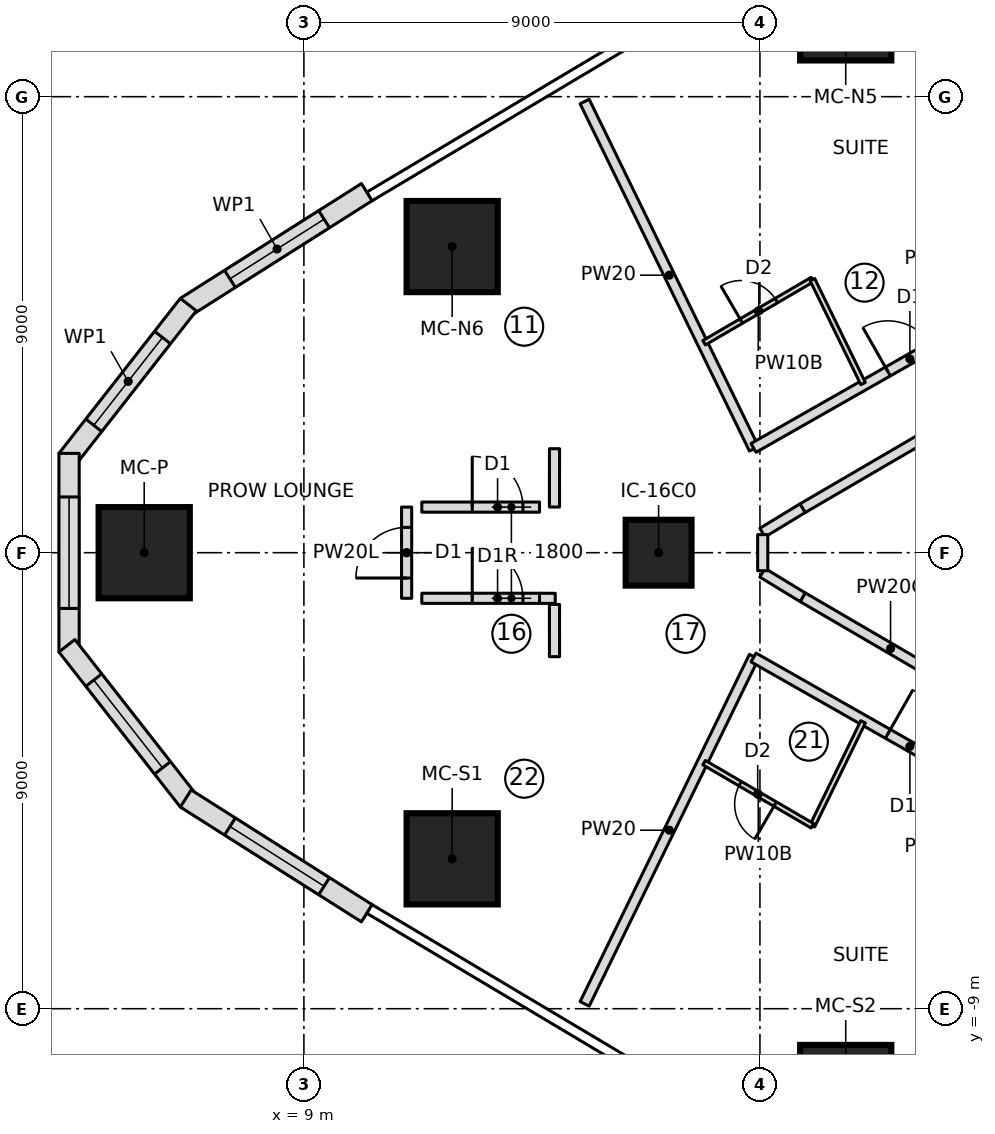
"""IFC4 building model, lengths in metres.
Left out: names, types, materials, properties, quantities, classifications, styles, units other than length and angle.
Written with IfcOpenShell. Run it as: python <this file> out.ifc"""

import sys

from ifc_helpers import new_model, si_unit, direction, frame, frame_2d, origin, origin_2d, place, context, subcontext, project, spatial, polyline, rectangle, outline, extrude, element, fill, save


model = new_model("IFC4")
c1 = context("Model", 3, precision=1e-05, world=origin(), true_north=direction((0.0, 1.0)))
c2 = subcontext(c1, "Body", "Model", "MODEL_VIEW")
j1 = project(units=[si_unit("LENGTHUNIT", "METRE"), si_unit("PLANEANGLEUNIT", "RADIAN")], contexts=[c1])
p1 = place(None, origin())
s1 = spatial("IfcSite", under=j1, at=p1, CompositionType="ELEMENT")
p2 = place(p1, origin())
s2 = spatial("IfcBuilding", under=s1, at=p2, CompositionType="ELEMENT")
p3 = place(p2, frame((0.0, 0.0, 50.25)))
s3 = spatial("IfcBuildingStorey", under=s2, at=p3, CompositionType="ELEMENT", Elevation=50.25)
for number, where, z_axis, x_axis in (
    (1, (5.848, 0.0, 0.0), (0.0, 0.0, 1.0), (1.0, 0.0, 0.0)),
    (2, (11.927, -6.042, 0.0), (0.0, 0.0, 1.0), (1.0, 0.0, 0.0)),
    (3, (19.693, -10.615, 0.0), (0.0, 0.0, 1.0), (1.0, 0.0, 0.0)),
    (4, (19.693, 10.615, 0.0), (0.0, 0.0, 1.0), (1.0, 0.0, 0.0)),
    (5, (11.927, 6.042, 0.0), (0.0, 0.0, 1.0), (1.0, 0.0, 0.0)),
):
    element("IfcColumn", number, at=place(p3, frame(where, z_axis=z_axis, x_axis=x_axis)), inside=s3, PredefinedType="COLUMN", context=c2, shape_type="SweptSolid", body=[
        extrude(rectangle(XDim=1.8, YDim=1.8, at=origin_2d()), origin(), (0.0, 0.0, 1.0), 3.55),
    ])
p4 = place(p3, frame((16.0, 0.0, 0.0), z_axis=(0.0, 0.0, 1.0), x_axis=(1.0, 0.0, 0.0)))
e6 = element("IfcColumn", 6, at=p4, inside=s3, PredefinedType="COLUMN", context=c2, shape_type="SweptSolid", body=[
    extrude(rectangle(XDim=1.3, YDim=1.3, at=origin_2d()), origin(), (0.0, 0.0, 1.0), 3.55),
])
p5 = place(p3, frame((10.242, 7.116, 0.0), z_axis=(0.0, 0.0, 1.0), x_axis=(-0.844551578623, -0.535474211372, 0.0)))
e7 = element("IfcWall", 7, at=p5, inside=s3, PredefinedType="NOTDEFINED", context=c2, shape_type="SweptSolid", body=[
    extrude(outline(polyline([(0.0, -0.2), (4.23, -0.2), (4.162, 0.2), (0.0, 0.2), (0.0, -0.2)])), origin(), (0.0, 0.0, 1.0), 3.25),
])
p6 = place(p5, frame((0.998, 0.0, 0.6)))
e8 = element("IfcOpeningElement", 8, at=p6, cuts=e7, PredefinedType="OPENING", context=c2, shape_type="SweptSolid", body=[
    extrude(outline(polyline([(0.0, 1.35), (0.084, 1.771), (0.322, 2.128), (0.679, 2.366), (1.1, 2.45), (1.521, 2.366), (1.878, 2.128), (2.116, 1.771), (2.2, 1.35), (2.2, 1.1), (2.116, 0.679), (1.878, 0.322), (1.521, 0.084), (1.1, 0.0), (0.679, 0.084), (0.322, 0.322), (0.084, 0.679), (0.0, 1.1), (0.0, 1.35)])), frame((0.0, 0.21, 0.0), z_axis=(0.0, -1.0, 0.0), x_axis=(1.0, 0.0, 0.0)), (0.0, 0.0, 1.0), 0.42),
])
p7 = place(p3, frame((6.698, 4.87, 0.0), z_axis=(0.0, 0.0, 1.0), x_axis=(-0.616586647779, -0.787287054245, 0.0)))
e9 = element("IfcWall", 9, at=p7, inside=s3, PredefinedType="NOTDEFINED", context=c2, shape_type="SweptSolid", body=[
    extrude(outline(polyline([(-0.034, -0.2), (3.852, -0.2), (3.714, 0.2), (0.034, 0.2), (-0.034, -0.2)])), origin(), (0.0, 0.0, 1.0), 3.25),
])
p8 = place(p7, frame((0.792, 0.0, 0.6)))
e10 = element("IfcOpeningElement", 10, at=p8, cuts=e9, PredefinedType="OPENING", context=c2, shape_type="SweptSolid", body=[
    extrude(outline(polyline([(0.0, 1.35), (0.084, 1.771), (0.322, 2.128), (0.679, 2.366), (1.1, 2.45), (1.521, 2.366), (1.878, 2.128), (2.116, 1.771), (2.2, 1.35), (2.2, 1.1), (2.116, 0.679), (1.878, 0.322), (1.521, 0.084), (1.1, 0.0), (0.679, 0.084), (0.322, 0.322), (0.084, 0.679), (0.0, 1.1), (0.0, 1.35)])), frame((0.0, 0.21, 0.0), z_axis=(0.0, -1.0, 0.0), x_axis=(1.0, 0.0, 0.0)), (0.0, 0.0, 1.0), 0.42),
])
p9 = place(p3, frame((4.365, 1.891, 0.0), z_axis=(0.0, 0.0, 1.0), x_axis=(0.0, -1.0, 0.0)))
e11 = element("IfcWall", 11, at=p9, inside=s3, PredefinedType="NOTDEFINED", context=c2, shape_type="SweptSolid", body=[
    extrude(outline(polyline([(-0.069, -0.2), (3.852, -0.2), (3.714, 0.2), (0.069, 0.2), (-0.069, -0.2)])), origin(), (0.0, 0.0, 1.0), 3.25),
])
p10 = place(p9, frame((0.792, 0.0, 0.6)))
e12 = element("IfcOpeningElement", 12, at=p10, cuts=e11, PredefinedType="OPENING", context=c2, shape_type="SweptSolid", body=[
    extrude(outline(polyline([(0.0, 1.35), (0.084, 1.771), (0.322, 2.128), (0.679, 2.366), (1.1, 2.45), (1.521, 2.366), (1.878, 2.128), (2.116, 1.771), (2.2, 1.35), (2.2, 1.1), (2.116, 0.679), (1.878, 0.322), (1.521, 0.084), (1.1, 0.0), (0.679, 0.084), (0.322, 0.322), (0.084, 0.679), (0.0, 1.1), (0.0, 1.35)])), frame((0.0, 0.21, 0.0), z_axis=(0.0, -1.0, 0.0), x_axis=(1.0, 0.0, 0.0)), (0.0, 0.0, 1.0), 0.42),
])
p11 = place(p3, frame((4.365, -1.891, 0.0), z_axis=(0.0, 0.0, 1.0), x_axis=(0.616586647779, -0.787287054245, 0.0)))
e13 = element("IfcWall", 13, at=p11, inside=s3, PredefinedType="NOTDEFINED", context=c2, shape_type="SweptSolid", body=[
    extrude(outline(polyline([(-0.069, -0.2), (3.817, -0.2), (3.749, 0.2), (0.069, 0.2), (-0.069, -0.2)])), origin(), (0.0, 0.0, 1.0), 3.25),
])
p12 = place(p11, frame((0.792, 0.0, 0.6)))
e14 = element("IfcOpeningElement", 14, at=p12, cuts=e13, PredefinedType="OPENING", context=c2, shape_type="SweptSolid", body=[
    extrude(outline(polyline([(0.0, 1.35), (0.084, 1.771), (0.322, 2.128), (0.679, 2.366), (1.1, 2.45), (1.521, 2.366), (1.878, 2.128), (2.116, 1.771), (2.2, 1.35), (2.2, 1.1), (2.116, 0.679), (1.878, 0.322), (1.521, 0.084), (1.1, 0.0), (0.679, 0.084), (0.322, 0.322), (0.084, 0.679), (0.0, 1.1), (0.0, 1.35)])), frame((0.0, 0.21, 0.0), z_axis=(0.0, -1.0, 0.0), x_axis=(1.0, 0.0, 0.0)), (0.0, 0.0, 1.0), 0.42),
])
p13 = place(p3, frame((6.698, -4.87, 0.0), z_axis=(0.0, 0.0, 1.0), x_axis=(0.844551578623, -0.535474211372, 0.0)))
e15 = element("IfcWall", 15, at=p13, inside=s3, PredefinedType="NOTDEFINED", context=c2, shape_type="SweptSolid", body=[
    extrude(outline(polyline([(-0.034, -0.2), (4.196, -0.2), (4.196, 0.2), (0.034, 0.2), (-0.034, -0.2)])), origin(), (0.0, 0.0, 1.0), 3.25),
])
p14 = place(p13, frame((0.998, 0.0, 0.6)))
e16 = element("IfcOpeningElement", 16, at=p14, cuts=e15, PredefinedType="OPENING", context=c2, shape_type="SweptSolid", body=[
    extrude(outline(polyline([(0.0, 1.35), (0.084, 1.771), (0.322, 2.128), (0.679, 2.366), (1.1, 2.45), (1.521, 2.366), (1.878, 2.128), (2.116, 1.771), (2.2, 1.35), (2.2, 1.1), (2.116, 0.679), (1.878, 0.322), (1.521, 0.084), (1.1, 0.0), (0.679, 0.084), (0.322, 0.322), (0.084, 0.679), (0.0, 1.1), (0.0, 1.35)])), frame((0.0, 0.21, 0.0), z_axis=(0.0, -1.0, 0.0), x_axis=(1.0, 0.0, 0.0)), (0.0, 0.0, 1.0), 0.42),
])
p15 = place(p3, frame((11.027, -0.9, 0.0), z_axis=(0.0, 0.0, 1.0), x_axis=(0.0, 1.0, 0.0)))
e17 = element("IfcWall", 17, at=p15, inside=s3, PredefinedType="PARTITIONING", context=c2, shape_type="SweptSolid", body=[
    extrude(rectangle(XDim=1.8, YDim=0.2, at=frame_2d((0.9, 0.0))), origin(), (0.0, 0.0, 1.0), 3.25),
])
p16 = place(p15, frame((0.4, 0.0, 0.0)))
e18 = element("IfcOpeningElement", 18, at=p16, cuts=e17, PredefinedType="OPENING", context=c2, shape_type="SweptSolid", body=[
    extrude(rectangle(XDim=1.0, YDim=2.1, at=frame_2d((0.5, 1.05))), frame((0.0, 0.11, 0.0), z_axis=(0.0, -1.0, 0.0), x_axis=(1.0, 0.0, 0.0)), (0.0, 0.0, 1.0), 0.22),
])
p17 = place(p3, frame((17.882, 2.05, 0.0), z_axis=(0.0, 0.0, 1.0), x_axis=(-0.438213564788, 0.898870887078, 0.0)))
e19 = element("IfcWall", 19, at=p17, inside=s3, PredefinedType="PARTITIONING", context=c2, shape_type="SweptSolid", body=[
    extrude(rectangle(XDim=7.625, YDim=0.2, at=frame_2d((3.813, 0.0))), origin(), (0.0, 0.0, 1.0), 3.25),
])
p18 = place(p3, frame((17.874, 2.068, 0.0), z_axis=(0.0, 0.0, 1.0), x_axis=(0.869280098963, 0.494319845391, 0.0)))
e20 = element("IfcWall", 20, at=p18, inside=s3, PredefinedType="PARTITIONING", context=c2, shape_type="SweptSolid", body=[
    extrude(rectangle(XDim=8.417, YDim=0.2, at=frame_2d((4.208, 0.0))), origin(), (0.0, 0.0, 1.0), 3.25),
])
p19 = place(p18, frame((3.05, 0.0, 0.0)))
e21 = element("IfcOpeningElement", 21, at=p19, cuts=e20, PredefinedType="OPENING", context=c2, shape_type="SweptSolid", body=[
    extrude(rectangle(XDim=1.0, YDim=2.1, at=frame_2d((0.5, 1.05))), frame((0.0, 0.11, 0.0), z_axis=(0.0, -1.0, 0.0), x_axis=(1.0, 0.0, 0.0)), (0.0, 0.0, 1.0), 0.22),
])
p20 = place(p3, frame((16.898, 4.144, 0.0), z_axis=(0.0, 0.0, 1.0), x_axis=(0.863707305865, 0.503993739837, 0.0)))
e22 = element("IfcWall", 22, at=p20, inside=s3, PredefinedType="PARTITIONING", context=c2, shape_type="SweptSolid", body=[
    extrude(rectangle(XDim=2.474, YDim=0.1, at=frame_2d((1.237, 0.0))), origin(), (0.0, 0.0, 1.0), 3.25),
])
p21 = place(p20, frame((0.85, 0.0, 0.0)))
e23 = element("IfcOpeningElement", 23, at=p21, cuts=e22, PredefinedType="OPENING", context=c2, shape_type="SweptSolid", body=[
    extrude(rectangle(XDim=0.8, YDim=2.1, at=frame_2d((0.4, 1.05))), frame((0.0, 0.06, 0.0), z_axis=(0.0, -1.0, 0.0), x_axis=(1.0, 0.0, 0.0)), (0.0, 0.0, 1.0), 0.12),
])
p22 = place(p3, frame((19.035, 5.39, 0.0), z_axis=(0.0, 0.0, 1.0), x_axis=(0.438122322582, -0.898915363344, 0.0)))
e24 = element("IfcWall", 24, at=p22, inside=s3, PredefinedType="PARTITIONING", context=c2, shape_type="SweptSolid", body=[
    extrude(rectangle(XDim=2.283, YDim=0.1, at=frame_2d((1.142, 0.0))), origin(), (0.0, 0.0, 1.0), 3.25),
])
p23 = place(p3, frame((14.541, -8.904, 0.0), z_axis=(0.0, 0.0, 1.0), x_axis=(0.438213564788, 0.898870887078, 0.0)))
e25 = element("IfcWall", 25, at=p23, inside=s3, PredefinedType="PARTITIONING", context=c2, shape_type="SweptSolid", body=[
    extrude(rectangle(XDim=7.625, YDim=0.2, at=frame_2d((3.813, 0.0))), origin(), (0.0, 0.0, 1.0), 3.25),
])
p24 = place(p3, frame((17.874, -2.068, 0.0), z_axis=(0.0, 0.0, 1.0), x_axis=(0.869280098963, -0.494319845391, 0.0)))
e26 = element("IfcWall", 26, at=p24, inside=s3, PredefinedType="PARTITIONING", context=c2, shape_type="SweptSolid", body=[
    extrude(rectangle(XDim=8.417, YDim=0.2, at=frame_2d((4.208, 0.0))), origin(), (0.0, 0.0, 1.0), 3.25),
])
p25 = place(p24, frame((3.05, 0.0, 0.0)))
e27 = element("IfcOpeningElement", 27, at=p25, cuts=e26, PredefinedType="OPENING", context=c2, shape_type="SweptSolid", body=[
    extrude(rectangle(XDim=1.0, YDim=2.1, at=frame_2d((0.5, 1.05))), frame((0.0, 0.11, 0.0), z_axis=(0.0, -1.0, 0.0), x_axis=(1.0, 0.0, 0.0)), (0.0, 0.0, 1.0), 0.22),
])
p26 = place(p3, frame((20.035, -3.338, 0.0), z_axis=(0.0, 0.0, 1.0), x_axis=(-0.438122322582, -0.898915363344, 0.0)))
e28 = element("IfcWall", 28, at=p26, inside=s3, PredefinedType="PARTITIONING", context=c2, shape_type="SweptSolid", body=[
    extrude(rectangle(XDim=2.283, YDim=0.1, at=frame_2d((1.142, 0.0))), origin(), (0.0, 0.0, 1.0), 3.25),
])
p27 = place(p3, frame((19.035, -5.39, 0.0), z_axis=(0.0, 0.0, 1.0), x_axis=(-0.863707305865, 0.503993739837, 0.0)))
e29 = element("IfcWall", 29, at=p27, inside=s3, PredefinedType="PARTITIONING", context=c2, shape_type="SweptSolid", body=[
    extrude(rectangle(XDim=2.474, YDim=0.1, at=frame_2d((1.237, 0.0))), origin(), (0.0, 0.0, 1.0), 3.25),
])
p28 = place(p27, frame((0.85, 0.0, 0.0)))
e30 = element("IfcOpeningElement", 30, at=p28, cuts=e29, PredefinedType="OPENING", context=c2, shape_type="SweptSolid", body=[
    extrude(rectangle(XDim=0.8, YDim=2.1, at=frame_2d((0.4, 1.05))), frame((0.0, 0.06, 0.0), z_axis=(0.0, -1.0, 0.0), x_axis=(1.0, 0.0, 0.0)), (0.0, 0.0, 1.0), 0.12),
])
p29 = place(p3, frame((22.312, -2.903, 0.0), z_axis=(0.0, 0.0, 1.0), x_axis=(-0.863710538269, 0.503988200341, 0.0)))
e31 = element("IfcWall", 31, at=p29, inside=s3, PredefinedType="PARTITIONING", context=c2, shape_type="SweptSolid", body=[
    extrude(rectangle(XDim=4.016, YDim=0.2, at=frame_2d((2.008, 0.0))), origin(), (0.0, 0.0, 1.0), 3.25),
])
for number, where, z_axis, x_axis in (
    (32, (18.844, -0.879, 0.0), (0.0, 0.0, 1.0), (-0.854, 0.52, 0.0)),
    (33, (18.05, 0.396, 0.0), (0.0, 0.0, 1.0), (0.854, 0.52, 0.0)),
):
    element("IfcWall", number, at=place(p3, frame(where, z_axis=z_axis, x_axis=x_axis)), inside=s3, PredefinedType="PARTITIONING", context=c2, shape_type="SweptSolid", body=[
        extrude(rectangle(XDim=0.929, YDim=0.2, at=frame_2d((0.464, 0.0))), origin(), (0.0, 0.0, 1.0), 3.25),
    ])
p30 = place(p3, frame((18.844, 0.879, 0.0), z_axis=(0.0, 0.0, 1.0), x_axis=(0.863710538269, 0.503988200341, 0.0)))
e34 = element("IfcWall", 34, at=p30, inside=s3, PredefinedType="PARTITIONING", context=c2, shape_type="SweptSolid", body=[
    extrude(rectangle(XDim=4.016, YDim=0.2, at=frame_2d((2.008, 0.0))), origin(), (0.0, 0.0, 1.0), 3.25),
])
p31 = place(p3, frame((11.327, 0.9, 0.0), z_axis=(0.0, 0.0, 1.0), x_axis=(1.0, 0.0, 0.0)))
e35 = element("IfcWall", 35, at=p31, inside=s3, PredefinedType="PARTITIONING", context=c2, shape_type="SweptSolid", body=[
    extrude(rectangle(XDim=2.323, YDim=0.2, at=frame_2d((1.161, 0.0))), origin(), (0.0, 0.0, 1.0), 3.25),
])
p32 = place(p31, frame((0.995, 0.0, 0.0)))
e36 = element("IfcOpeningElement", 36, at=p32, cuts=e35, PredefinedType="OPENING", context=c2, shape_type="SweptSolid", body=[
    extrude(rectangle(XDim=1.0, YDim=2.1, at=frame_2d((0.5, 1.05))), frame((0.0, 0.11, 0.0), z_axis=(0.0, -1.0, 0.0), x_axis=(1.0, 0.0, 0.0)), (0.0, 0.0, 1.0), 0.22),
])
p33 = place(p3, frame((11.327, -0.9, 0.0), z_axis=(0.0, 0.0, 1.0), x_axis=(1.0, 0.0, 0.0)))
e37 = element("IfcWall", 37, at=p33, inside=s3, PredefinedType="PARTITIONING", context=c2, shape_type="SweptSolid", body=[
    extrude(rectangle(XDim=2.323, YDim=0.2, at=frame_2d((1.161, 0.0))), origin(), (0.0, 0.0, 1.0), 3.25),
])
p34 = place(p33, frame((0.995, 0.0, 0.0)))
e38 = element("IfcOpeningElement", 38, at=p34, cuts=e37, PredefinedType="OPENING", context=c2, shape_type="SweptSolid", body=[
    extrude(rectangle(XDim=1.0, YDim=2.1, at=frame_2d((0.5, 1.05))), frame((0.0, 0.11, 0.0), z_axis=(0.0, -1.0, 0.0), x_axis=(1.0, 0.0, 0.0)), (0.0, 0.0, 1.0), 0.22),
])
p35 = place(p3, frame((18.055, -0.357, 0.0), z_axis=(0.0, 0.0, 1.0), x_axis=(0.0, 1.0, 0.0)))
e39 = element("IfcWall", 39, at=p35, inside=s3, PredefinedType="PARTITIONING", context=c2, shape_type="SweptSolid", body=[
    extrude(rectangle(XDim=0.713, YDim=0.2, at=frame_2d((0.357, 0.0))), origin(), (0.0, 0.0, 1.0), 3.25),
])
p36 = place(p3, frame((13.946, 2.052, 0.0), z_axis=(0.0, 0.0, 1.0), x_axis=(-0.000424178117, -0.999999910036, 0.0)))
e40 = element("IfcWall", 40, at=p36, inside=s3, PredefinedType="PARTITIONING", context=c2, shape_type="SweptSolid", body=[
    extrude(rectangle(XDim=1.151, YDim=0.2, at=frame_2d((0.576, 0.0))), origin(), (0.0, 0.0, 1.0), 3.25),
])
p37 = place(p3, frame((13.65, -0.9, 0.0), z_axis=(0.0, 0.0, 1.0), x_axis=(0.999984810316, -0.005511727301, 0.0)))
e41 = element("IfcWall", 41, at=p37, inside=s3, PredefinedType="PARTITIONING", context=c2, shape_type="SweptSolid", body=[
    extrude(rectangle(XDim=0.31, YDim=0.2, at=frame_2d((0.155, 0.0))), origin(), (0.0, 0.0, 1.0), 3.25),
])
p38 = place(p3, frame((13.945, -1.021, 0.0), z_axis=(0.0, 0.0, 1.0), x_axis=(0.000473596916, -0.999999887853, 0.0)))
e42 = element("IfcWall", 42, at=p38, inside=s3, PredefinedType="PARTITIONING", context=c2, shape_type="SweptSolid", body=[
    extrude(rectangle(XDim=1.031, YDim=0.2, at=frame_2d((0.516, 0.0))), origin(), (0.0, 0.0, 1.0), 3.25),
])
p39 = place(p6, origin())
e43 = element("IfcWindow", 43, at=p39, inside=s3, PartitioningType="SINGLE_PANEL", PredefinedType="WINDOW", context=c2, shape_type="SweptSolid", body=[
    extrude(outline(polyline([(0.0, 1.35), (0.084, 1.771), (0.322, 2.128), (0.679, 2.366), (1.1, 2.45), (1.521, 2.366), (1.878, 2.128), (2.116, 1.771), (2.2, 1.35), (2.2, 1.1), (2.116, 0.679), (1.878, 0.322), (1.521, 0.084), (1.1, 0.0), (0.679, 0.084), (0.322, 0.322), (0.084, 0.679), (0.0, 1.1), (0.0, 1.35)])), frame((0.0, 0.17, 0.0), z_axis=(0.0, -1.0, 0.0), x_axis=(1.0, 0.0, 0.0)), (0.0, 0.0, 1.0), 0.06),
])
fill(e8, e43)
p40 = place(p8, origin())
e44 = element("IfcWindow", 44, at=p40, inside=s3, PartitioningType="SINGLE_PANEL", PredefinedType="WINDOW", context=c2, shape_type="SweptSolid", body=[
    extrude(outline(polyline([(0.0, 1.35), (0.084, 1.771), (0.322, 2.128), (0.679, 2.366), (1.1, 2.45), (1.521, 2.366), (1.878, 2.128), (2.116, 1.771), (2.2, 1.35), (2.2, 1.1), (2.116, 0.679), (1.878, 0.322), (1.521, 0.084), (1.1, 0.0), (0.679, 0.084), (0.322, 0.322), (0.084, 0.679), (0.0, 1.1), (0.0, 1.35)])), frame((0.0, 0.17, 0.0), z_axis=(0.0, -1.0, 0.0), x_axis=(1.0, 0.0, 0.0)), (0.0, 0.0, 1.0), 0.06),
])
fill(e10, e44)
p41 = place(p10, origin())
e45 = element("IfcWindow", 45, at=p41, inside=s3, PartitioningType="SINGLE_PANEL", PredefinedType="WINDOW", context=c2, shape_type="SweptSolid", body=[
    extrude(outline(polyline([(0.0, 1.35), (0.084, 1.771), (0.322, 2.128), (0.679, 2.366), (1.1, 2.45), (1.521, 2.366), (1.878, 2.128), (2.116, 1.771), (2.2, 1.35), (2.2, 1.1), (2.116, 0.679), (1.878, 0.322), (1.521, 0.084), (1.1, 0.0), (0.679, 0.084), (0.322, 0.322), (0.084, 0.679), (0.0, 1.1), (0.0, 1.35)])), frame((0.0, 0.17, 0.0), z_axis=(0.0, -1.0, 0.0), x_axis=(1.0, 0.0, 0.0)), (0.0, 0.0, 1.0), 0.06),
])
fill(e12, e45)
p42 = place(p12, origin())
e46 = element("IfcWindow", 46, at=p42, inside=s3, PartitioningType="SINGLE_PANEL", PredefinedType="WINDOW", context=c2, shape_type="SweptSolid", body=[
    extrude(outline(polyline([(0.0, 1.35), (0.084, 1.771), (0.322, 2.128), (0.679, 2.366), (1.1, 2.45), (1.521, 2.366), (1.878, 2.128), (2.116, 1.771), (2.2, 1.35), (2.2, 1.1), (2.116, 0.679), (1.878, 0.322), (1.521, 0.084), (1.1, 0.0), (0.679, 0.084), (0.322, 0.322), (0.084, 0.679), (0.0, 1.1), (0.0, 1.35)])), frame((0.0, 0.17, 0.0), z_axis=(0.0, -1.0, 0.0), x_axis=(1.0, 0.0, 0.0)), (0.0, 0.0, 1.0), 0.06),
])
fill(e14, e46)
p43 = place(p14, origin())
e47 = element("IfcWindow", 47, at=p43, inside=s3, PartitioningType="SINGLE_PANEL", PredefinedType="WINDOW", context=c2, shape_type="SweptSolid", body=[
    extrude(outline(polyline([(0.0, 1.35), (0.084, 1.771), (0.322, 2.128), (0.679, 2.366), (1.1, 2.45), (1.521, 2.366), (1.878, 2.128), (2.116, 1.771), (2.2, 1.35), (2.2, 1.1), (2.116, 0.679), (1.878, 0.322), (1.521, 0.084), (1.1, 0.0), (0.679, 0.084), (0.322, 0.322), (0.084, 0.679), (0.0, 1.1), (0.0, 1.35)])), frame((0.0, 0.17, 0.0), z_axis=(0.0, -1.0, 0.0), x_axis=(1.0, 0.0, 0.0)), (0.0, 0.0, 1.0), 0.06),
])
fill(e16, e47)
p44 = place(p32, origin())
e48 = element("IfcDoor", 48, at=p44, inside=s3, OperationType="SINGLE_SWING_LEFT", PredefinedType="DOOR", context=c2, shape_type="SweptSolid", body=[
    extrude(rectangle(XDim=1.0, YDim=2.1, at=frame_2d((0.5, 1.05))), frame((0.0, 0.025, 0.0), z_axis=(0.0, -1.0, 0.0), x_axis=(1.0, 0.0, 0.0)), (0.0, 0.0, 1.0), 0.05),
])
fill(e36, e48)
p45 = place(p34, origin())
e49 = element("IfcDoor", 49, at=p45, inside=s3, OperationType="SINGLE_SWING_RIGHT", PredefinedType="DOOR", context=c2, shape_type="SweptSolid", body=[
    extrude(rectangle(XDim=1.0, YDim=2.1, at=frame_2d((0.5, 1.05))), frame((0.0, 0.025, 0.0), z_axis=(0.0, -1.0, 0.0), x_axis=(1.0, 0.0, 0.0)), (0.0, 0.0, 1.0), 0.05),
])
fill(e38, e49)
p46 = place(p16, origin())
e50 = element("IfcDoor", 50, at=p46, inside=s3, OperationType="SINGLE_SWING_LEFT", PredefinedType="DOOR", context=c2, shape_type="SweptSolid", body=[
    extrude(rectangle(XDim=1.0, YDim=2.1, at=frame_2d((0.5, 1.05))), frame((0.0, 0.025, 0.0), z_axis=(0.0, -1.0, 0.0), x_axis=(1.0, 0.0, 0.0)), (0.0, 0.0, 1.0), 0.05),
])
fill(e18, e50)
p47 = place(p21, origin())
e51 = element("IfcDoor", 51, at=p47, inside=s3, OperationType="SINGLE_SWING_LEFT", PredefinedType="DOOR", context=c2, shape_type="SweptSolid", body=[
    extrude(rectangle(XDim=0.8, YDim=2.1, at=frame_2d((0.4, 1.05))), frame((0.0, 0.025, 0.0), z_axis=(0.0, -1.0, 0.0), x_axis=(1.0, 0.0, 0.0)), (0.0, 0.0, 1.0), 0.05),
])
fill(e23, e51)
p48 = place(p19, origin())
e52 = element("IfcDoor", 52, at=p48, inside=s3, OperationType="SINGLE_SWING_LEFT", PredefinedType="DOOR", context=c2, shape_type="SweptSolid", body=[
    extrude(rectangle(XDim=1.0, YDim=2.1, at=frame_2d((0.5, 1.05))), frame((0.0, 0.025, 0.0), z_axis=(0.0, -1.0, 0.0), x_axis=(1.0, 0.0, 0.0)), (0.0, 0.0, 1.0), 0.05),
])
fill(e21, e52)
p49 = place(p28, origin())
e53 = element("IfcDoor", 53, at=p49, inside=s3, OperationType="SINGLE_SWING_LEFT", PredefinedType="DOOR", context=c2, shape_type="SweptSolid", body=[
    extrude(rectangle(XDim=0.8, YDim=2.1, at=frame_2d((0.4, 1.05))), frame((0.0, 0.025, 0.0), z_axis=(0.0, -1.0, 0.0), x_axis=(1.0, 0.0, 0.0)), (0.0, 0.0, 1.0), 0.05),
])
fill(e30, e53)
p50 = place(p25, origin())
e54 = element("IfcDoor", 54, at=p50, inside=s3, OperationType="SINGLE_SWING_RIGHT", PredefinedType="DOOR", context=c2, shape_type="SweptSolid", body=[
    extrude(rectangle(XDim=1.0, YDim=2.1, at=frame_2d((0.5, 1.05))), frame((0.0, 0.025, 0.0), z_axis=(0.0, -1.0, 0.0), x_axis=(1.0, 0.0, 0.0)), (0.0, 0.0, 1.0), 0.05),
])
fill(e27, e54)
save(model, sys.argv[1])
